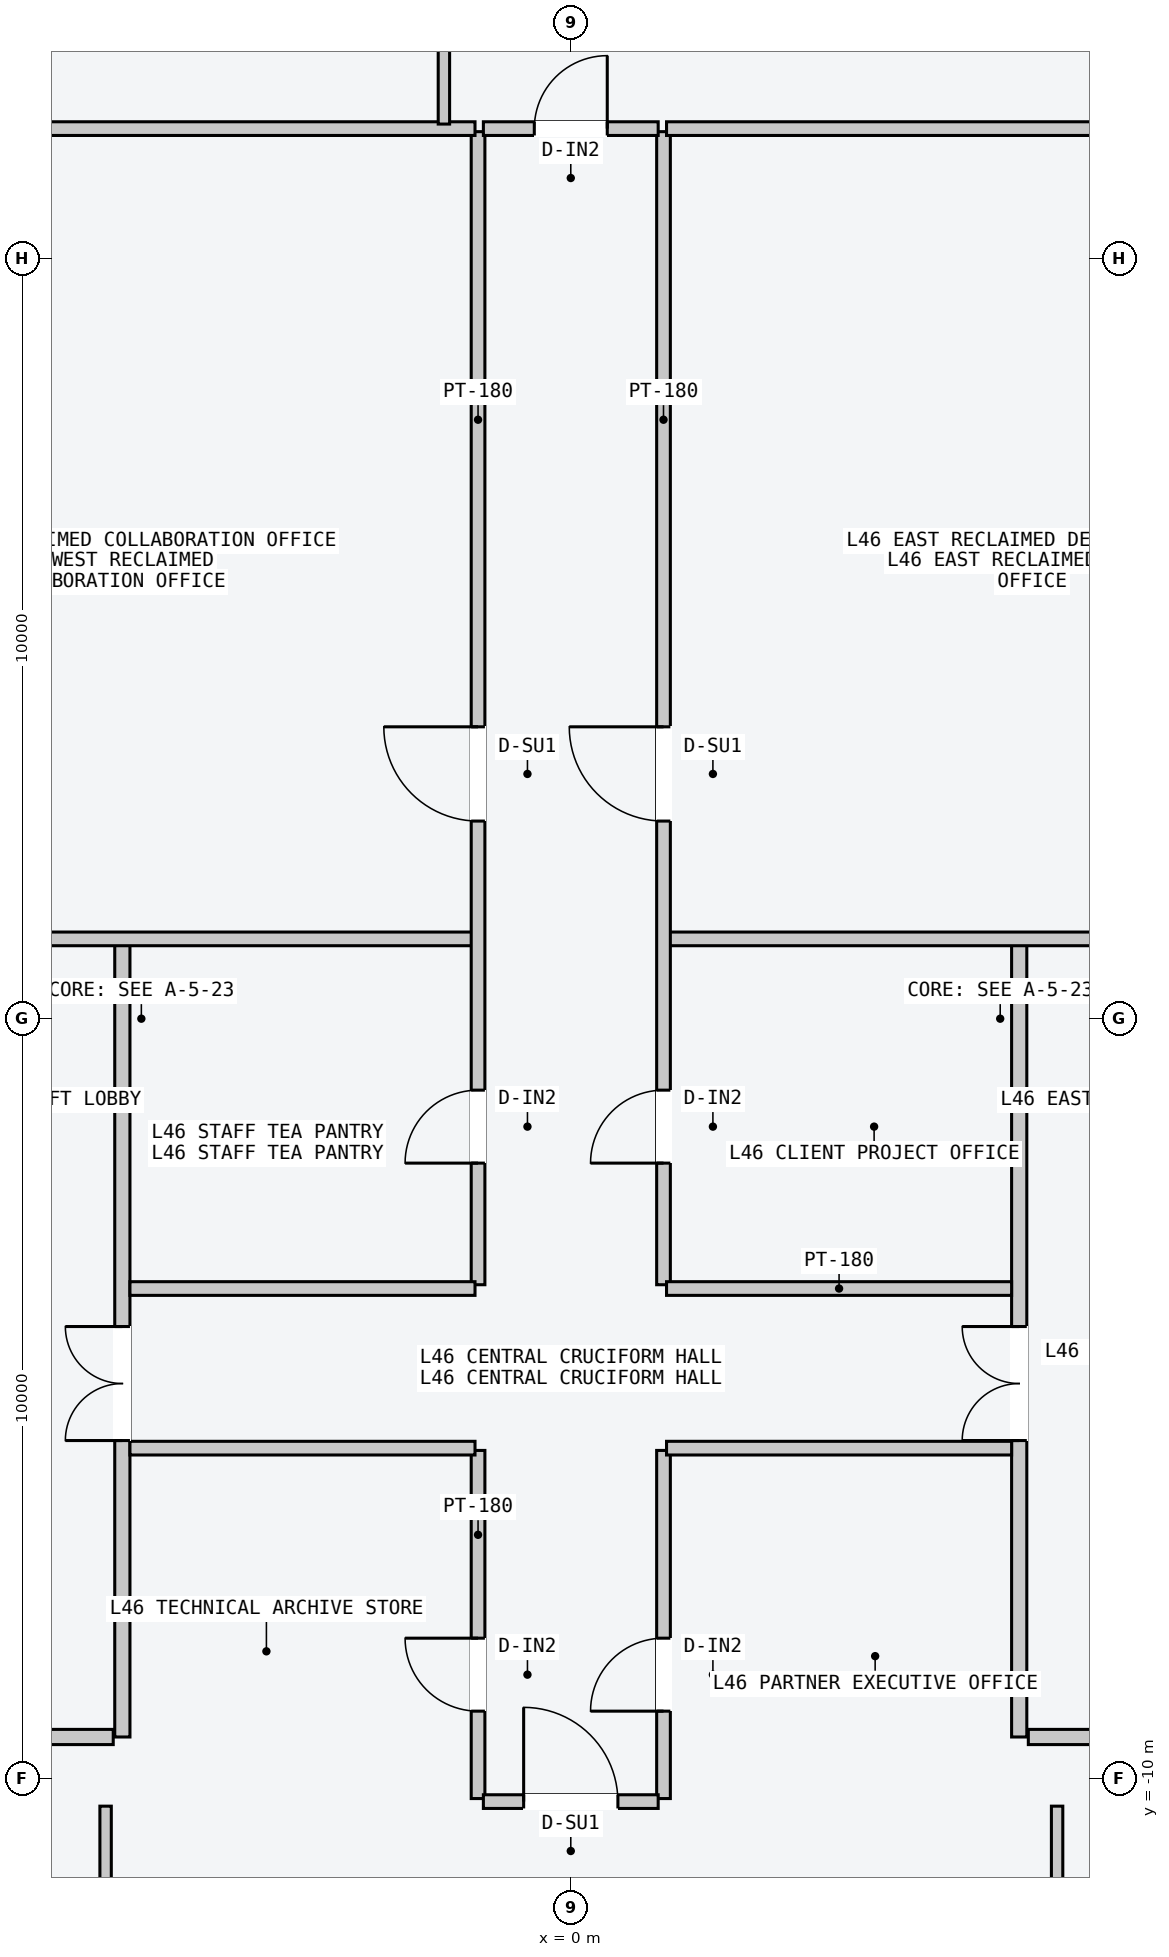
"""IFC4 building model, lengths in metres.
Left out: names, types, materials, properties, quantities, classifications, styles, units other than length and angle.
Written with IfcOpenShell. Run it as: python <this file> out.ifc"""

import sys

from ifc_helpers import new_model, si_unit, direction, frame, frame_2d, origin, place, context, subcontext, project, spatial, rectangle, extrude, element, fill, save


model = new_model("IFC4")
c1 = context("Model", 3, precision=1e-05, world=origin(), true_north=direction((0.0, 1.0)))
c2 = subcontext(c1, "Body", "Model", "MODEL_VIEW")
j1 = project(units=[si_unit("LENGTHUNIT", "METRE"), si_unit("PLANEANGLEUNIT", "RADIAN")], contexts=[c1])
p1 = place(None, origin())
s1 = spatial("IfcSite", under=j1, at=p1, CompositionType="ELEMENT")
p2 = place(p1, origin())
s2 = spatial("IfcBuilding", under=s1, at=p2, CompositionType="ELEMENT")
p3 = place(p2, frame((0.0, 0.0, 176.7)))
s3 = spatial("IfcBuildingStorey", under=s2, at=p3, CompositionType="ELEMENT", Elevation=176.7)
p4 = place(p3, frame((-5.9, -9.45, 0.0), z_axis=(0.0, 0.0, 1.0), x_axis=(0.0, 1.0, 0.0)))
e1 = element("IfcWall", 1, at=p4, inside=s3, PredefinedType="PARTITIONING", context=c2, shape_type="SweptSolid", body=[
    extrude(rectangle(XDim=10.5, YDim=0.2, at=frame_2d((5.25, 0.0))), origin(), (0.0, 0.0, 1.0), 3.4),
])
p5 = place(p4, frame((3.9, 0.0, 0.0)))
e2 = element("IfcOpeningElement", 2, at=p5, cuts=e1, PredefinedType="OPENING", context=c2, shape_type="SweptSolid", body=[
    extrude(rectangle(XDim=1.5, YDim=2.2, at=frame_2d((0.75, 1.1))), frame((0.0, 0.11, 0.0), z_axis=(0.0, -1.0, 0.0), x_axis=(1.0, 0.0, 0.0)), (0.0, 0.0, 1.0), 0.22),
])
p6 = place(p3, frame((-6.02, -9.45, 0.0), z_axis=(0.0, 0.0, 1.0), x_axis=(-1.0, 0.0, 0.0)))
e3 = element("IfcWall", 3, at=p6, inside=s3, PredefinedType="PARTITIONING", context=c2, shape_type="SweptSolid", body=[
    extrude(rectangle(XDim=1.8, YDim=0.2, at=frame_2d((0.9, 0.0))), origin(), (0.0, 0.0, 1.0), 3.4),
])
p7 = place(p3, frame((5.9, -9.45, 0.0), z_axis=(0.0, 0.0, 1.0), x_axis=(0.0, 1.0, 0.0)))
e4 = element("IfcWall", 4, at=p7, inside=s3, PredefinedType="PARTITIONING", context=c2, shape_type="SweptSolid", body=[
    extrude(rectangle(XDim=10.5, YDim=0.2, at=frame_2d((5.25, 0.0))), origin(), (0.0, 0.0, 1.0), 3.4),
])
p8 = place(p7, frame((3.9, 0.0, 0.0)))
e5 = element("IfcOpeningElement", 5, at=p8, cuts=e4, PredefinedType="OPENING", context=c2, shape_type="SweptSolid", body=[
    extrude(rectangle(XDim=1.5, YDim=2.2, at=frame_2d((0.75, 1.1))), frame((0.0, 0.11, 0.0), z_axis=(0.0, -1.0, 0.0), x_axis=(1.0, 0.0, 0.0)), (0.0, 0.0, 1.0), 0.22),
])
p9 = place(p3, frame((6.02, -9.45, 0.0), z_axis=(0.0, 0.0, 1.0), x_axis=(1.0, 0.0, 0.0)))
e6 = element("IfcWall", 6, at=p9, inside=s3, PredefinedType="PARTITIONING", context=c2, shape_type="SweptSolid", body=[
    extrude(rectangle(XDim=1.8, YDim=0.2, at=frame_2d((0.9, 0.0))), origin(), (0.0, 0.0, 1.0), 3.4),
])
p10 = place(p3, frame((-10.05, 1.05, 0.0), z_axis=(0.0, 0.0, 1.0), x_axis=(1.0, 0.0, 0.0)))
e7 = element("IfcWall", 7, at=p10, inside=s3, PredefinedType="PARTITIONING", context=c2, shape_type="SweptSolid", body=[
    extrude(rectangle(XDim=8.79, YDim=0.18, at=frame_2d((4.395, 0.0))), origin(), (0.0, 0.0, 1.0), 3.4),
])
p11 = place(p3, frame((-1.22, -3.5, 0.0), z_axis=(0.0, 0.0, 1.0), x_axis=(0.0, 1.0, 0.0)))
e8 = element("IfcWall", 8, at=p11, inside=s3, PredefinedType="PARTITIONING", context=c2, shape_type="SweptSolid", body=[
    extrude(rectangle(XDim=15.17, YDim=0.18, at=frame_2d((7.585, 0.0))), origin(), (0.0, 0.0, 1.0), 3.4),
])
p12 = place(p11, frame((6.1, 0.0, 0.0)))
e9 = element("IfcOpeningElement", 9, at=p12, cuts=e8, PredefinedType="OPENING", context=c2, shape_type="SweptSolid", body=[
    extrude(rectangle(XDim=1.24, YDim=2.24, at=frame_2d((0.62, 1.12))), frame((0.0, 0.1, 0.0), z_axis=(0.0, -1.0, 0.0), x_axis=(1.0, 0.0, 0.0)), (0.0, 0.0, 1.0), 0.2),
])
p13 = place(p11, frame((1.6, 0.0, 0.0)))
e10 = element("IfcOpeningElement", 10, at=p13, cuts=e8, PredefinedType="OPENING", context=c2, shape_type="SweptSolid", body=[
    extrude(rectangle(XDim=0.96, YDim=2.18, at=frame_2d((0.48, 1.09))), frame((0.0, 0.1, 0.0), z_axis=(0.0, -1.0, 0.0), x_axis=(1.0, 0.0, 0.0)), (0.0, 0.0, 1.0), 0.2),
])
p14 = place(p3, frame((-7.5, 11.71, 0.0), z_axis=(0.0, 0.0, 1.0), x_axis=(1.0, 0.0, 0.0)))
e11 = element("IfcWall", 11, at=p14, inside=s3, PredefinedType="PARTITIONING", context=c2, shape_type="SweptSolid", body=[
    extrude(rectangle(XDim=6.24, YDim=0.18, at=frame_2d((3.12, 0.0))), origin(), (0.0, 0.0, 1.0), 3.4),
])
p15 = place(p3, frame((-5.8, -3.55, 0.0), z_axis=(0.0, 0.0, 1.0), x_axis=(1.0, 0.0, 0.0)))
e12 = element("IfcWall", 12, at=p15, inside=s3, PredefinedType="PARTITIONING", context=c2, shape_type="SweptSolid", body=[
    extrude(rectangle(XDim=4.54, YDim=0.18, at=frame_2d((2.27, 0.0))), origin(), (0.0, 0.0, 1.0), 3.4),
])
p16 = place(p3, frame((1.26, 1.05, 0.0), z_axis=(0.0, 0.0, 1.0), x_axis=(1.0, 0.0, 0.0)))
e13 = element("IfcWall", 13, at=p16, inside=s3, PredefinedType="PARTITIONING", context=c2, shape_type="SweptSolid", body=[
    extrude(rectangle(XDim=8.8, YDim=0.18, at=frame_2d((4.4, 0.0))), origin(), (0.0, 0.0, 1.0), 3.4),
])
p17 = place(p3, frame((1.22, -3.5, 0.0), z_axis=(0.0, 0.0, 1.0), x_axis=(0.0, 1.0, 0.0)))
e14 = element("IfcWall", 14, at=p17, inside=s3, PredefinedType="PARTITIONING", context=c2, shape_type="SweptSolid", body=[
    extrude(rectangle(XDim=15.17, YDim=0.18, at=frame_2d((7.585, 0.0))), origin(), (0.0, 0.0, 1.0), 3.4),
])
p18 = place(p17, frame((6.1, 0.0, 0.0)))
e15 = element("IfcOpeningElement", 15, at=p18, cuts=e14, PredefinedType="OPENING", context=c2, shape_type="SweptSolid", body=[
    extrude(rectangle(XDim=1.24, YDim=2.24, at=frame_2d((0.62, 1.12))), frame((0.0, 0.1, 0.0), z_axis=(0.0, -1.0, 0.0), x_axis=(1.0, 0.0, 0.0)), (0.0, 0.0, 1.0), 0.2),
])
p19 = place(p17, frame((1.6, 0.0, 0.0)))
e16 = element("IfcOpeningElement", 16, at=p19, cuts=e14, PredefinedType="OPENING", context=c2, shape_type="SweptSolid", body=[
    extrude(rectangle(XDim=0.96, YDim=2.18, at=frame_2d((0.48, 1.09))), frame((0.0, 0.1, 0.0), z_axis=(0.0, -1.0, 0.0), x_axis=(1.0, 0.0, 0.0)), (0.0, 0.0, 1.0), 0.2),
])
p20 = place(p3, frame((1.26, 11.71, 0.0), z_axis=(0.0, 0.0, 1.0), x_axis=(1.0, 0.0, 0.0)))
e17 = element("IfcWall", 17, at=p20, inside=s3, PredefinedType="PARTITIONING", context=c2, shape_type="SweptSolid", body=[
    extrude(rectangle(XDim=6.24, YDim=0.18, at=frame_2d((3.12, 0.0))), origin(), (0.0, 0.0, 1.0), 3.4),
])
p21 = place(p3, frame((1.26, -3.55, 0.0), z_axis=(0.0, 0.0, 1.0), x_axis=(1.0, 0.0, 0.0)))
e18 = element("IfcWall", 18, at=p21, inside=s3, PredefinedType="PARTITIONING", context=c2, shape_type="SweptSolid", body=[
    extrude(rectangle(XDim=4.54, YDim=0.18, at=frame_2d((2.27, 0.0))), origin(), (0.0, 0.0, 1.0), 3.4),
])
p22 = place(p3, frame((-1.22, -10.26, 0.0), z_axis=(0.0, 0.0, 1.0), x_axis=(0.0, 1.0, 0.0)))
e19 = element("IfcWall", 19, at=p22, inside=s3, PredefinedType="PARTITIONING", context=c2, shape_type="SweptSolid", body=[
    extrude(rectangle(XDim=4.58, YDim=0.18, at=frame_2d((2.29, 0.0))), origin(), (0.0, 0.0, 1.0), 3.4),
])
p23 = place(p22, frame((1.15, 0.0, 0.0)))
e20 = element("IfcOpeningElement", 20, at=p23, cuts=e19, PredefinedType="OPENING", context=c2, shape_type="SweptSolid", body=[
    extrude(rectangle(XDim=0.96, YDim=2.18, at=frame_2d((0.48, 1.09))), frame((0.0, 0.1, 0.0), z_axis=(0.0, -1.0, 0.0), x_axis=(1.0, 0.0, 0.0)), (0.0, 0.0, 1.0), 0.2),
])
p24 = place(p3, frame((1.22, -10.26, 0.0), z_axis=(0.0, 0.0, 1.0), x_axis=(0.0, 1.0, 0.0)))
e21 = element("IfcWall", 21, at=p24, inside=s3, PredefinedType="PARTITIONING", context=c2, shape_type="SweptSolid", body=[
    extrude(rectangle(XDim=4.58, YDim=0.18, at=frame_2d((2.29, 0.0))), origin(), (0.0, 0.0, 1.0), 3.4),
])
p25 = place(p24, frame((1.15, 0.0, 0.0)))
e22 = element("IfcOpeningElement", 22, at=p25, cuts=e21, PredefinedType="OPENING", context=c2, shape_type="SweptSolid", body=[
    extrude(rectangle(XDim=0.96, YDim=2.18, at=frame_2d((0.48, 1.09))), frame((0.0, 0.1, 0.0), z_axis=(0.0, -1.0, 0.0), x_axis=(1.0, 0.0, 0.0)), (0.0, 0.0, 1.0), 0.2),
])
for number, where, z_axis, x_axis in (
    (23, (-5.8, -5.65, 0.0), (0.0, 0.0, 1.0), (1.0, 0.0, 0.0)),
    (24, (1.26, -5.65, 0.0), (0.0, 0.0, 1.0), (1.0, 0.0, 0.0)),
):
    element("IfcWall", number, at=place(p3, frame(where, z_axis=z_axis, x_axis=x_axis)), inside=s3, PredefinedType="PARTITIONING", context=c2, shape_type="SweptSolid", body=[
        extrude(rectangle(XDim=4.54, YDim=0.18, at=frame_2d((2.27, 0.0))), origin(), (0.0, 0.0, 1.0), 3.4),
    ])
p26 = place(p3, frame((-1.669, 11.77, 0.0), z_axis=(0.0, 0.0, 1.0), x_axis=(0.0, 1.0, 0.0)))
e25 = element("IfcWall", 25, at=p26, inside=s3, PredefinedType="PARTITIONING", context=c2, shape_type="SweptSolid", body=[
    extrude(rectangle(XDim=6.79, YDim=0.15, at=frame_2d((3.395, 0.0))), origin(), (0.0, 0.0, 1.0), 3.4),
])
p27 = place(p26, frame((1.15, 0.0, 0.0)))
e26 = element("IfcOpeningElement", 26, at=p27, cuts=e25, PredefinedType="OPENING", context=c2, shape_type="SweptSolid", body=[
    extrude(rectangle(XDim=0.96, YDim=2.18, at=frame_2d((0.48, 1.09))), frame((0.0, 0.085, 0.0), z_axis=(0.0, -1.0, 0.0), x_axis=(1.0, 0.0, 0.0)), (0.0, 0.0, 1.0), 0.17),
])
p28 = place(p3, frame((-1.15, 11.71, 0.0), z_axis=(0.0, 0.0, 1.0), x_axis=(1.0, 0.0, 0.0)))
e27 = element("IfcWall", 27, at=p28, inside=s3, PredefinedType="PARTITIONING", context=c2, shape_type="SweptSolid", body=[
    extrude(rectangle(XDim=2.3, YDim=0.18, at=frame_2d((1.15, 0.0))), origin(), (0.0, 0.0, 1.0), 3.4),
])
p29 = place(p28, frame((0.67, 0.0, 0.0)))
e28 = element("IfcOpeningElement", 28, at=p29, cuts=e27, PredefinedType="OPENING", context=c2, shape_type="SweptSolid", body=[
    extrude(rectangle(XDim=0.96, YDim=2.18, at=frame_2d((0.48, 1.09))), frame((0.0, 0.1, 0.0), z_axis=(0.0, -1.0, 0.0), x_axis=(1.0, 0.0, 0.0)), (0.0, 0.0, 1.0), 0.2),
])
p30 = place(p3, frame((-6.12, -18.56, 0.0), z_axis=(0.0, 0.0, 1.0), x_axis=(0.0, 1.0, 0.0)))
e29 = element("IfcWall", 29, at=p30, inside=s3, PredefinedType="PARTITIONING", context=c2, shape_type="SweptSolid", body=[
    extrude(rectangle(XDim=8.2, YDim=0.15, at=frame_2d((4.1, 0.0))), origin(), (0.0, 0.0, 1.0), 3.4),
])
p31 = place(p30, frame((1.05, 0.0, 0.0)))
e30 = element("IfcOpeningElement", 30, at=p31, cuts=e29, PredefinedType="OPENING", context=c2, shape_type="SweptSolid", body=[
    extrude(rectangle(XDim=0.96, YDim=2.18, at=frame_2d((0.48, 1.09))), frame((0.0, 0.085, 0.0), z_axis=(0.0, -1.0, 0.0), x_axis=(1.0, 0.0, 0.0)), (0.0, 0.0, 1.0), 0.17),
])
p32 = place(p3, frame((6.399, -18.56, 0.0), z_axis=(0.0, 0.0, 1.0), x_axis=(0.0, 1.0, 0.0)))
e31 = element("IfcWall", 31, at=p32, inside=s3, PredefinedType="PARTITIONING", context=c2, shape_type="SweptSolid", body=[
    extrude(rectangle(XDim=8.2, YDim=0.15, at=frame_2d((4.1, 0.0))), origin(), (0.0, 0.0, 1.0), 3.4),
])
p33 = place(p32, frame((1.34, 0.0, 0.0)))
e32 = element("IfcOpeningElement", 32, at=p33, cuts=e31, PredefinedType="OPENING", context=c2, shape_type="SweptSolid", body=[
    extrude(rectangle(XDim=0.96, YDim=2.18, at=frame_2d((0.48, 1.09))), frame((0.0, 0.085, 0.0), z_axis=(0.0, -1.0, 0.0), x_axis=(1.0, 0.0, 0.0)), (0.0, 0.0, 1.0), 0.17),
])
p34 = place(p3, frame((-1.15, -10.3, 0.0), z_axis=(0.0, 0.0, 1.0), x_axis=(1.0, 0.0, 0.0)))
e33 = element("IfcWall", 33, at=p34, inside=s3, PredefinedType="PARTITIONING", context=c2, shape_type="SweptSolid", body=[
    extrude(rectangle(XDim=2.3, YDim=0.18, at=frame_2d((1.15, 0.0))), origin(), (0.0, 0.0, 1.0), 3.4),
])
p35 = place(p34, frame((0.53, 0.0, 0.0)))
e34 = element("IfcOpeningElement", 34, at=p35, cuts=e33, PredefinedType="OPENING", context=c2, shape_type="SweptSolid", body=[
    extrude(rectangle(XDim=1.24, YDim=2.24, at=frame_2d((0.62, 1.12))), frame((0.0, 0.1, 0.0), z_axis=(0.0, -1.0, 0.0), x_axis=(1.0, 0.0, 0.0)), (0.0, 0.0, 1.0), 0.2),
])
p36 = place(p5, origin())
e35 = element("IfcDoor", 35, at=p36, inside=s3, OperationType="DOUBLE_DOOR_SINGLE_SWING", PredefinedType="DOOR", context=c2, shape_type="SweptSolid", body=[
    extrude(rectangle(XDim=1.5, YDim=2.2, at=frame_2d((0.75, 1.1))), frame((0.0, 0.025, 0.0), z_axis=(0.0, -1.0, 0.0), x_axis=(1.0, 0.0, 0.0)), (0.0, 0.0, 1.0), 0.05),
])
fill(e2, e35)
p37 = place(p8, origin())
e36 = element("IfcDoor", 36, at=p37, inside=s3, OperationType="DOUBLE_DOOR_SINGLE_SWING", PredefinedType="DOOR", context=c2, shape_type="SweptSolid", body=[
    extrude(rectangle(XDim=1.5, YDim=2.2, at=frame_2d((0.75, 1.1))), frame((0.0, 0.025, 0.0), z_axis=(0.0, -1.0, 0.0), x_axis=(1.0, 0.0, 0.0)), (0.0, 0.0, 1.0), 0.05),
])
fill(e5, e36)
p38 = place(p12, origin())
e37 = element("IfcDoor", 37, at=p38, inside=s3, OperationType="SINGLE_SWING_RIGHT", PredefinedType="DOOR", context=c2, shape_type="SweptSolid", body=[
    extrude(rectangle(XDim=1.24, YDim=2.24, at=frame_2d((0.62, 1.12))), frame((0.0, 0.025, 0.0), z_axis=(0.0, -1.0, 0.0), x_axis=(1.0, 0.0, 0.0)), (0.0, 0.0, 1.0), 0.05),
])
fill(e9, e37)
p39 = place(p13, origin())
e38 = element("IfcDoor", 38, at=p39, inside=s3, OperationType="SINGLE_SWING_LEFT", PredefinedType="DOOR", context=c2, shape_type="SweptSolid", body=[
    extrude(rectangle(XDim=0.96, YDim=2.18, at=frame_2d((0.48, 1.09))), frame((0.0, 0.025, 0.0), z_axis=(0.0, -1.0, 0.0), x_axis=(1.0, 0.0, 0.0)), (0.0, 0.0, 1.0), 0.05),
])
fill(e10, e38)
p40 = place(p18, origin())
e39 = element("IfcDoor", 39, at=p40, inside=s3, OperationType="SINGLE_SWING_RIGHT", PredefinedType="DOOR", context=c2, shape_type="SweptSolid", body=[
    extrude(rectangle(XDim=1.24, YDim=2.24, at=frame_2d((0.62, 1.12))), frame((0.0, 0.025, 0.0), z_axis=(0.0, -1.0, 0.0), x_axis=(1.0, 0.0, 0.0)), (0.0, 0.0, 1.0), 0.05),
])
fill(e15, e39)
p41 = place(p19, origin())
e40 = element("IfcDoor", 40, at=p41, inside=s3, OperationType="SINGLE_SWING_LEFT", PredefinedType="DOOR", context=c2, shape_type="SweptSolid", body=[
    extrude(rectangle(XDim=0.96, YDim=2.18, at=frame_2d((0.48, 1.09))), frame((0.0, 0.025, 0.0), z_axis=(0.0, -1.0, 0.0), x_axis=(1.0, 0.0, 0.0)), (0.0, 0.0, 1.0), 0.05),
])
fill(e16, e40)
p42 = place(p23, origin())
e41 = element("IfcDoor", 41, at=p42, inside=s3, OperationType="SINGLE_SWING_RIGHT", PredefinedType="DOOR", context=c2, shape_type="SweptSolid", body=[
    extrude(rectangle(XDim=0.96, YDim=2.18, at=frame_2d((0.48, 1.09))), frame((0.0, 0.025, 0.0), z_axis=(0.0, -1.0, 0.0), x_axis=(1.0, 0.0, 0.0)), (0.0, 0.0, 1.0), 0.05),
])
fill(e20, e41)
p43 = place(p25, origin())
e42 = element("IfcDoor", 42, at=p43, inside=s3, OperationType="SINGLE_SWING_LEFT", PredefinedType="DOOR", context=c2, shape_type="SweptSolid", body=[
    extrude(rectangle(XDim=0.96, YDim=2.18, at=frame_2d((0.48, 1.09))), frame((0.0, 0.025, 0.0), z_axis=(0.0, -1.0, 0.0), x_axis=(1.0, 0.0, 0.0)), (0.0, 0.0, 1.0), 0.05),
])
fill(e22, e42)
p44 = place(p29, origin())
e43 = element("IfcDoor", 43, at=p44, inside=s3, OperationType="SINGLE_SWING_RIGHT", PredefinedType="DOOR", context=c2, shape_type="SweptSolid", body=[
    extrude(rectangle(XDim=0.96, YDim=2.18, at=frame_2d((0.48, 1.09))), frame((0.0, 0.025, 0.0), z_axis=(0.0, -1.0, 0.0), x_axis=(1.0, 0.0, 0.0)), (0.0, 0.0, 1.0), 0.05),
])
fill(e28, e43)
p45 = place(p35, origin())
e44 = element("IfcDoor", 44, at=p45, inside=s3, OperationType="SINGLE_SWING_LEFT", PredefinedType="DOOR", context=c2, shape_type="SweptSolid", body=[
    extrude(rectangle(XDim=1.24, YDim=2.24, at=frame_2d((0.62, 1.12))), frame((0.0, 0.025, 0.0), z_axis=(0.0, -1.0, 0.0), x_axis=(1.0, 0.0, 0.0)), (0.0, 0.0, 1.0), 0.05),
])
fill(e34, e44)
save(model, sys.argv[1])
